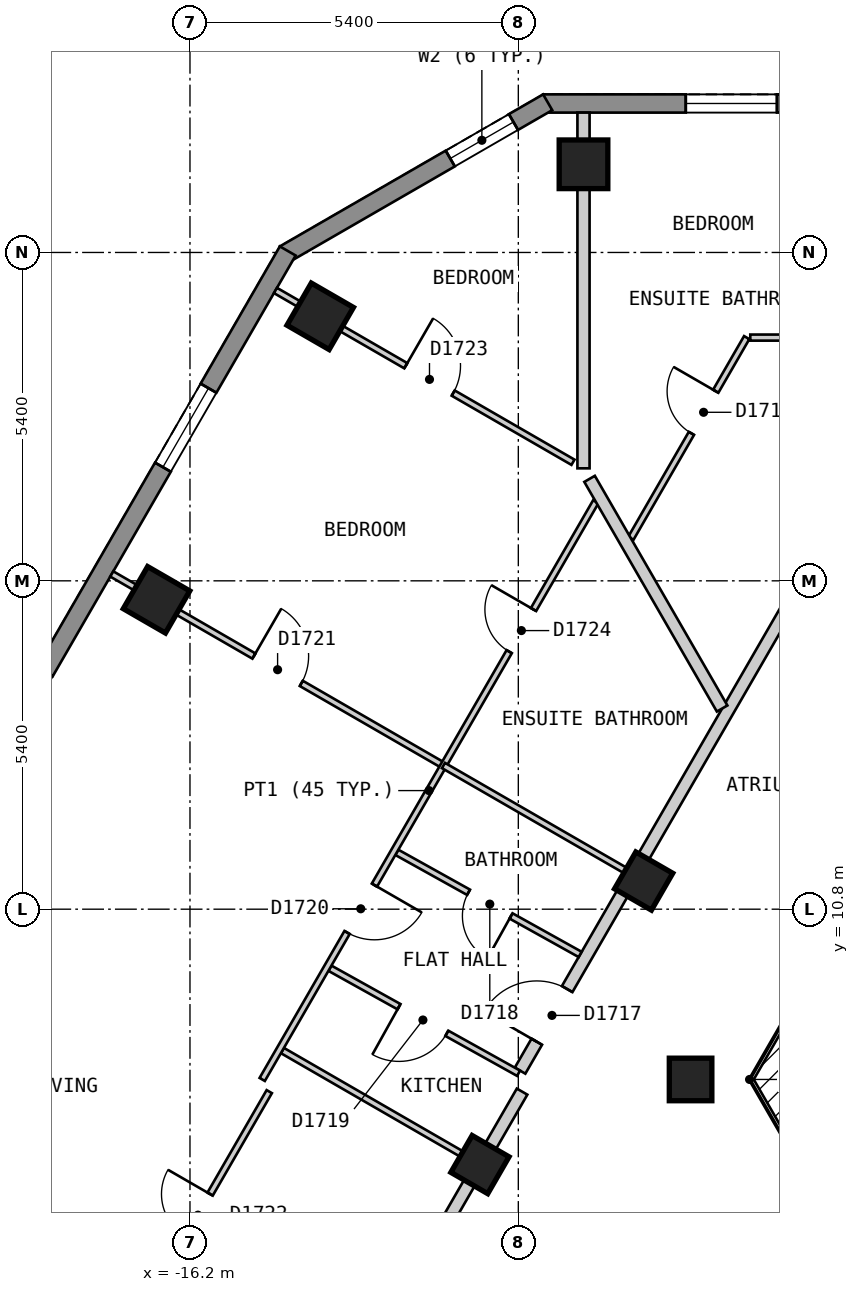
"""IFC4 building model, lengths in metres.
Left out: names, types, materials, properties, quantities, classifications, styles, units other than length and angle.
Written with IfcOpenShell. Run it as: python <this file> out.ifc"""

import sys

from ifc_helpers import new_model, si_unit, direction, frame, frame_2d, origin, origin_2d, place, context, subcontext, project, spatial, polyline, rectangle, outline, extrude, element, fill, save


model = new_model("IFC4")
c1 = context("Model", 3, precision=1e-05, world=origin(), true_north=direction((0.0, 1.0)))
c2 = subcontext(c1, "Body", "Model", "MODEL_VIEW")
j1 = project(units=[si_unit("LENGTHUNIT", "METRE"), si_unit("PLANEANGLEUNIT", "RADIAN")], contexts=[c1])
p1 = place(None, origin())
s1 = spatial("IfcSite", under=j1, at=p1, CompositionType="ELEMENT")
p2 = place(p1, origin())
s2 = spatial("IfcBuilding", under=s1, at=p2, CompositionType="ELEMENT")
p3 = place(p2, frame((0.0, 0.0, 187.2)))
s3 = spatial("IfcBuildingStorey", under=s2, at=p3, CompositionType="ELEMENT", Elevation=187.2)
for number, where, z_axis, x_axis in (
    (1, (-9.728, 23.05, 0.0), (0.0, 0.0, 1.0), (-1.0, 0.0, 0.0)),
    (2, (-14.058, 20.55, 0.0), (0.0, 0.0, 1.0), (-0.5, -0.866, 0.0)),
    (3, (-16.75, 15.888, 0.0), (0.0, 0.0, 1.0), (-0.5, -0.866, 0.0)),
):
    element("IfcColumn", number, at=place(p3, frame(where, z_axis=z_axis, x_axis=x_axis)), inside=s3, PredefinedType="COLUMN", context=c2, shape_type="SweptSolid", body=[
        extrude(rectangle(XDim=0.8, YDim=0.8, at=origin_2d()), origin(), (0.0, 0.0, 1.0), 3.0),
    ])
for number, where, z_axis, x_axis in (
    (4, (-8.739, 11.263, 0.0), (0.0, 0.0, 1.0), (-0.5, -0.866, 0.0)),
    (5, (-7.967, 8.0, 0.0), (0.0, 0.0, 1.0), (1.0, 0.0, 0.0)),
    (6, (-11.431, 6.6, 0.0), (0.0, 0.0, 1.0), (-0.5, -0.866, 0.0)),
):
    element("IfcColumn", number, at=place(p3, frame(where, z_axis=z_axis, x_axis=x_axis)), inside=s3, PredefinedType="COLUMN", context=c2, shape_type="SweptSolid", body=[
        extrude(rectangle(XDim=0.7, YDim=0.7, at=origin_2d()), origin(), (0.0, 0.0, 1.0), 3.0),
    ])
p4 = place(p3, frame((10.392, 24.05, 0.0), z_axis=(0.0, 0.0, 1.0), x_axis=(-1.0, 0.0, 0.0)))
e7 = element("IfcWall", 7, at=p4, inside=s3, PredefinedType="SOLIDWALL", context=c2, shape_type="SweptSolid", body=[
    extrude(outline(polyline([(0.0, -0.15), (20.784, -0.15), (20.704, 0.15), (0.08, 0.15), (0.0, -0.15)])), origin(), (0.0, 0.0, 1.0), 2.7),
])
p5 = place(p4, frame((2.346, 0.0, 0.15)))
e8 = element("IfcOpeningElement", 8, at=p5, cuts=e7, PredefinedType="OPENING", context=c2, shape_type="SweptSolid", body=[
    extrude(rectangle(XDim=1.5, YDim=2.1, at=frame_2d((0.75, 1.05))), frame((0.0, 0.16, 0.0), z_axis=(0.0, -1.0, 0.0), x_axis=(1.0, 0.0, 0.0)), (0.0, 0.0, 1.0), 0.32),
])
p6 = place(p4, frame((7.21, 0.0, 0.15)))
e9 = element("IfcOpeningElement", 9, at=p6, cuts=e7, PredefinedType="OPENING", context=c2, shape_type="SweptSolid", body=[
    extrude(rectangle(XDim=1.5, YDim=2.1, at=frame_2d((0.75, 1.05))), frame((0.0, 0.16, 0.0), z_axis=(0.0, -1.0, 0.0), x_axis=(1.0, 0.0, 0.0)), (0.0, 0.0, 1.0), 0.32),
])
p7 = place(p4, frame((12.074, 0.0, 0.15)))
e10 = element("IfcOpeningElement", 10, at=p7, cuts=e7, PredefinedType="OPENING", context=c2, shape_type="SweptSolid", body=[
    extrude(rectangle(XDim=1.5, YDim=2.1, at=frame_2d((0.75, 1.05))), frame((0.0, 0.16, 0.0), z_axis=(0.0, -1.0, 0.0), x_axis=(1.0, 0.0, 0.0)), (0.0, 0.0, 1.0), 0.32),
])
p8 = place(p4, frame((16.938, 0.0, 0.15)))
e11 = element("IfcOpeningElement", 11, at=p8, cuts=e7, PredefinedType="OPENING", context=c2, shape_type="SweptSolid", body=[
    extrude(rectangle(XDim=1.5, YDim=2.1, at=frame_2d((0.75, 1.05))), frame((0.0, 0.16, 0.0), z_axis=(0.0, -1.0, 0.0), x_axis=(1.0, 0.0, 0.0)), (0.0, 0.0, 1.0), 0.32),
])
p9 = place(p3, frame((-10.317, 24.07, 0.0), z_axis=(0.0, 0.0, 1.0), x_axis=(-0.866022959057, -0.500004234368, 0.0)))
e12 = element("IfcWall", 12, at=p9, inside=s3, PredefinedType="SOLIDWALL", context=c2, shape_type="SweptSolid", body=[
    extrude(outline(polyline([(0.0, -0.15), (5.0, -0.15), (4.92, 0.15), (0.08, 0.15), (0.0, -0.15)])), origin(), (0.0, 0.0, 1.0), 2.7),
])
p10 = place(p9, frame((0.65, 0.0, 0.15)))
e13 = element("IfcOpeningElement", 13, at=p10, cuts=e12, PredefinedType="OPENING", context=c2, shape_type="SweptSolid", body=[
    extrude(rectangle(XDim=1.2, YDim=2.1, at=frame_2d((0.6, 1.05))), frame((0.0, 0.16, 0.0), z_axis=(0.0, -1.0, 0.0), x_axis=(1.0, 0.0, 0.0)), (0.0, 0.0, 1.0), 0.32),
])
p11 = place(p3, frame((-14.592, 21.625, 0.0), z_axis=(0.0, 0.0, 1.0), x_axis=(-0.500010537973, -0.866019319597, 0.0)))
e14 = element("IfcWall", 14, at=p11, inside=s3, PredefinedType="SOLIDWALL", context=c2, shape_type="SweptSolid", body=[
    extrude(outline(polyline([(0.0, -0.15), (22.863, -0.15), (22.783, 0.15), (0.08, 0.15), (0.0, -0.15)])), origin(), (0.0, 0.0, 1.0), 2.7),
])
p12 = place(p11, frame((2.606, 0.0, 0.15)))
e15 = element("IfcOpeningElement", 15, at=p12, cuts=e14, PredefinedType="OPENING", context=c2, shape_type="SweptSolid", body=[
    extrude(rectangle(XDim=1.5, YDim=2.1, at=frame_2d((0.75, 1.05))), frame((0.0, 0.16, 0.0), z_axis=(0.0, -1.0, 0.0), x_axis=(1.0, 0.0, 0.0)), (0.0, 0.0, 1.0), 0.32),
])
p13 = place(p11, frame((7.99, 0.0, 0.15)))
e16 = element("IfcOpeningElement", 16, at=p13, cuts=e14, PredefinedType="OPENING", context=c2, shape_type="SweptSolid", body=[
    extrude(rectangle(XDim=1.5, YDim=2.1, at=frame_2d((0.75, 1.05))), frame((0.0, 0.16, 0.0), z_axis=(0.0, -1.0, 0.0), x_axis=(1.0, 0.0, 0.0)), (0.0, 0.0, 1.0), 0.32),
])
p14 = place(p11, frame((13.373, 0.0, 0.15)))
e17 = element("IfcOpeningElement", 17, at=p14, cuts=e14, PredefinedType="OPENING", context=c2, shape_type="SweptSolid", body=[
    extrude(rectangle(XDim=1.5, YDim=2.1, at=frame_2d((0.75, 1.05))), frame((0.0, 0.16, 0.0), z_axis=(0.0, -1.0, 0.0), x_axis=(1.0, 0.0, 0.0)), (0.0, 0.0, 1.0), 0.32),
])
p15 = place(p11, frame((18.758, 0.0, 0.15)))
e18 = element("IfcOpeningElement", 18, at=p15, cuts=e14, PredefinedType="OPENING", context=c2, shape_type="SweptSolid", body=[
    extrude(rectangle(XDim=1.5, YDim=2.1, at=frame_2d((0.75, 1.05))), frame((0.0, 0.16, 0.0), z_axis=(0.0, -1.0, 0.0), x_axis=(1.0, 0.0, 0.0)), (0.0, 0.0, 1.0), 0.32),
])
p16 = place(p3, frame((-15.53, -0.501, 0.0), z_axis=(0.0, 0.0, 1.0), x_axis=(0.499952498232, 0.866052827206, 0.0)))
e19 = element("IfcWall", 19, at=p16, inside=s3, PredefinedType="PARTITIONING", context=c2, shape_type="SweptSolid", body=[
    extrude(rectangle(XDim=9.585, YDim=0.2, at=frame_2d((4.792, 0.0))), origin(), (0.0, 0.0, 1.0), 2.7),
])
p17 = place(p16, frame((0.525, 0.0, 0.0)))
e20 = element("IfcOpeningElement", 20, at=p17, cuts=e19, PredefinedType="OPENING", context=c2, shape_type="SweptSolid", body=[
    extrude(rectangle(XDim=1.0, YDim=2.1, at=frame_2d((0.5, 1.05))), frame((0.0, 0.11, 0.0), z_axis=(0.0, -1.0, 0.0), x_axis=(1.0, 0.0, 0.0)), (0.0, 0.0, 1.0), 0.22),
])
p18 = place(p3, frame((-10.771, 8.145, 0.0), z_axis=(0.0, 0.0, 1.0), x_axis=(0.500048075867, 0.865997645391, 0.0)))
e21 = element("IfcWall", 21, at=p18, inside=s3, PredefinedType="PARTITIONING", context=c2, shape_type="SweptSolid", body=[
    extrude(rectangle(XDim=10.687, YDim=0.2, at=frame_2d((5.344, 0.0))), origin(), (0.0, 0.0, 1.0), 2.7),
])
p19 = place(p18, frame((0.549, 0.0, 0.0)))
e22 = element("IfcOpeningElement", 22, at=p19, cuts=e21, PredefinedType="OPENING", context=c2, shape_type="SweptSolid", body=[
    extrude(rectangle(XDim=1.0, YDim=2.1, at=frame_2d((0.5, 1.05))), frame((0.0, 0.11, 0.0), z_axis=(0.0, -1.0, 0.0), x_axis=(1.0, 0.0, 0.0)), (0.0, 0.0, 1.0), 0.22),
])
p20 = place(p3, frame((-12.798, 11.735, 0.0), z_axis=(0.0, 0.0, 1.0), x_axis=(0.873649600774, -0.486555623816, 0.0)))
e23 = element("IfcWall", 23, at=p20, inside=s3, PredefinedType="PARTITIONING", context=c2, shape_type="SweptSolid", body=[
    extrude(rectangle(XDim=3.451, YDim=0.1, at=frame_2d((1.726, 0.0))), origin(), (0.0, 0.0, 1.0), 2.7),
])
p21 = place(p20, frame((1.35, 0.0, 0.0)))
e24 = element("IfcOpeningElement", 24, at=p21, cuts=e23, PredefinedType="OPENING", context=c2, shape_type="SweptSolid", body=[
    extrude(rectangle(XDim=0.8, YDim=2.1, at=frame_2d((0.4, 1.05))), frame((0.0, 0.06, 0.0), z_axis=(0.0, -1.0, 0.0), x_axis=(1.0, 0.0, 0.0)), (0.0, 0.0, 1.0), 0.12),
])
p22 = place(p3, frame((-13.898, 9.829, 0.0), z_axis=(0.0, 0.0, 1.0), x_axis=(0.873715787747, -0.486436760784, 0.0)))
e25 = element("IfcWall", 25, at=p22, inside=s3, PredefinedType="PARTITIONING", context=c2, shape_type="SweptSolid", body=[
    extrude(rectangle(XDim=3.55, YDim=0.1, at=frame_2d((1.775, 0.0))), origin(), (0.0, 0.0, 1.0), 2.7),
])
p23 = place(p22, frame((1.3, 0.0, 0.0)))
e26 = element("IfcOpeningElement", 26, at=p23, cuts=e25, PredefinedType="OPENING", context=c2, shape_type="SweptSolid", body=[
    extrude(rectangle(XDim=0.9, YDim=2.1, at=frame_2d((0.45, 1.05))), frame((0.0, 0.06, 0.0), z_axis=(0.0, -1.0, 0.0), x_axis=(1.0, 0.0, 0.0)), (0.0, 0.0, 1.0), 0.12),
])
p24 = place(p3, frame((-14.679, 8.475, 0.0), z_axis=(0.0, 0.0, 1.0), x_axis=(0.865995104784, -0.500052475737, 0.0)))
e27 = element("IfcWall", 27, at=p24, inside=s3, PredefinedType="PARTITIONING", context=c2, shape_type="SweptSolid", body=[
    extrude(rectangle(XDim=3.65, YDim=0.1, at=frame_2d((1.825, 0.0))), origin(), (0.0, 0.0, 1.0), 2.7),
])
p25 = place(p3, frame((-17.486, 16.313, 0.0), z_axis=(0.0, 0.0, 1.0), x_axis=(0.865997114097, -0.500048995975, 0.0)))
e28 = element("IfcWall", 28, at=p25, inside=s3, PredefinedType="PARTITIONING", context=c2, shape_type="SweptSolid", body=[
    extrude(rectangle(XDim=6.299, YDim=0.1, at=frame_2d((3.149, 0.0))), origin(), (0.0, 0.0, 1.0), 2.7),
])
p26 = place(p25, frame((2.699, 0.0, 0.0)))
e29 = element("IfcOpeningElement", 29, at=p26, cuts=e28, PredefinedType="OPENING", context=c2, shape_type="SweptSolid", body=[
    extrude(rectangle(XDim=0.9, YDim=2.1, at=frame_2d((0.45, 1.05))), frame((0.0, 0.06, 0.0), z_axis=(0.0, -1.0, 0.0), x_axis=(1.0, 0.0, 0.0)), (0.0, 0.0, 1.0), 0.12),
])
p27 = place(p3, frame((-14.794, 20.975, 0.0), z_axis=(0.0, 0.0, 1.0), x_axis=(0.866011447264, -0.500024172624, 0.0)))
e30 = element("IfcWall", 30, at=p27, inside=s3, PredefinedType="PARTITIONING", context=c2, shape_type="SweptSolid", body=[
    extrude(rectangle(XDim=5.65, YDim=0.1, at=frame_2d((2.825, 0.0))), origin(), (0.0, 0.0, 1.0), 2.7),
])
p28 = place(p27, frame((2.475, 0.0, 0.0)))
e31 = element("IfcOpeningElement", 31, at=p28, cuts=e30, PredefinedType="OPENING", context=c2, shape_type="SweptSolid", body=[
    extrude(rectangle(XDim=0.9, YDim=2.1, at=frame_2d((0.45, 1.05))), frame((0.0, 0.06, 0.0), z_axis=(0.0, -1.0, 0.0), x_axis=(1.0, 0.0, 0.0)), (0.0, 0.0, 1.0), 0.12),
])
p29 = place(p3, frame((-6.985, 20.2, 0.0), z_axis=(0.0, 0.0, 1.0), x_axis=(1.0, 0.0, 0.0)))
e32 = element("IfcWall", 32, at=p29, inside=s3, PredefinedType="PARTITIONING", context=c2, shape_type="SweptSolid", body=[
    extrude(rectangle(XDim=6.935, YDim=0.1, at=frame_2d((3.468, 0.0))), origin(), (0.0, 0.0, 1.0), 2.7),
])
p30 = place(p29, frame((4.153, 0.0, 0.0)))
e33 = element("IfcOpeningElement", 33, at=p30, cuts=e32, PredefinedType="OPENING", context=c2, shape_type="SweptSolid", body=[
    extrude(rectangle(XDim=0.8, YDim=2.1, at=frame_2d((0.4, 1.05))), frame((0.0, 0.06, 0.0), z_axis=(0.0, -1.0, 0.0), x_axis=(1.0, 0.0, 0.0)), (0.0, 0.0, 1.0), 0.12),
])
p31 = place(p3, frame((-8.949, 16.9, 0.0), z_axis=(0.0, 0.0, 1.0), x_axis=(0.499949850951, 0.866054355415, 0.0)))
e34 = element("IfcWall", 34, at=p31, inside=s3, PredefinedType="PARTITIONING", context=c2, shape_type="SweptSolid", body=[
    extrude(rectangle(XDim=3.811, YDim=0.1, at=frame_2d((1.905, 0.0))), origin(), (0.0, 0.0, 1.0), 2.7),
])
p32 = place(p31, frame((1.992, 0.0, 0.0)))
e35 = element("IfcOpeningElement", 35, at=p32, cuts=e34, PredefinedType="OPENING", context=c2, shape_type="SweptSolid", body=[
    extrude(rectangle(XDim=0.8, YDim=2.1, at=frame_2d((0.4, 1.05))), frame((0.0, 0.06, 0.0), z_axis=(0.0, -1.0, 0.0), x_axis=(1.0, 0.0, 0.0)), (0.0, 0.0, 1.0), 0.12),
])
p33 = place(p3, frame((-17.191, 3.824, 0.0), z_axis=(0.0, 0.0, 1.0), x_axis=(0.499891250406, 0.866088181288, 0.0)))
e36 = element("IfcWall", 36, at=p33, inside=s3, PredefinedType="PARTITIONING", context=c2, shape_type="SweptSolid", body=[
    extrude(rectangle(XDim=4.591, YDim=0.1, at=frame_2d((2.295, 0.0))), origin(), (0.0, 0.0, 1.0), 2.7),
])
p34 = place(p33, frame((1.845, 0.0, 0.0)))
e37 = element("IfcOpeningElement", 37, at=p34, cuts=e36, PredefinedType="OPENING", context=c2, shape_type="SweptSolid", body=[
    extrude(rectangle(XDim=0.8, YDim=2.1, at=frame_2d((0.4, 1.05))), frame((0.0, 0.06, 0.0), z_axis=(0.0, -1.0, 0.0), x_axis=(1.0, 0.0, 0.0)), (0.0, 0.0, 1.0), 0.12),
])
p35 = place(p3, frame((-15.012, 8.0, 0.0), z_axis=(0.0, 0.0, 1.0), x_axis=(0.500047346826, 0.865998066356, 0.0)))
e38 = element("IfcWall", 38, at=p35, inside=s3, PredefinedType="PARTITIONING", context=c2, shape_type="SweptSolid", body=[
    extrude(rectangle(XDim=10.971, YDim=0.1, at=frame_2d((5.486, 0.0))), origin(), (0.0, 0.0, 1.0), 2.7),
])
p36 = place(p35, frame((2.791, 0.0, 0.0)))
e39 = element("IfcOpeningElement", 39, at=p36, cuts=e38, PredefinedType="OPENING", context=c2, shape_type="SweptSolid", body=[
    extrude(rectangle(XDim=0.9, YDim=2.1, at=frame_2d((0.45, 1.05))), frame((0.0, 0.06, 0.0), z_axis=(0.0, -1.0, 0.0), x_axis=(1.0, 0.0, 0.0)), (0.0, 0.0, 1.0), 0.12),
])
p37 = place(p35, frame((8.124, 0.0, 0.0)))
e40 = element("IfcOpeningElement", 40, at=p37, cuts=e38, PredefinedType="OPENING", context=c2, shape_type="SweptSolid", body=[
    extrude(rectangle(XDim=0.8, YDim=2.1, at=frame_2d((0.4, 1.05))), frame((0.0, 0.06, 0.0), z_axis=(0.0, -1.0, 0.0), x_axis=(1.0, 0.0, 0.0)), (0.0, 0.0, 1.0), 0.12),
])
p38 = place(p3, frame((-9.628, 17.877, 0.0), z_axis=(0.0, 0.0, 1.0), x_axis=(0.499890461358, -0.866088636713, 0.0)))
e41 = element("IfcWall", 41, at=p38, inside=s3, PredefinedType="PARTITIONING", context=c2, shape_type="SweptSolid", body=[
    extrude(rectangle(XDim=4.361, YDim=0.2, at=frame_2d((2.18, 0.0))), origin(), (0.0, 0.0, 1.0), 2.7),
])
p39 = place(p3, frame((-22.87, 6.987, 0.0), z_axis=(0.0, 0.0, 1.0), x_axis=(0.866022959057, -0.500004234368, 0.0)))
e42 = element("IfcWall", 42, at=p39, inside=s3, PredefinedType="PARTITIONING", context=c2, shape_type="SweptSolid", body=[
    extrude(rectangle(XDim=10.0, YDim=0.2, at=frame_2d((5.0, 0.0))), origin(), (0.0, 0.0, 1.0), 2.7),
])
p40 = place(p3, frame((-9.728, 18.05, 0.0), z_axis=(0.0, 0.0, 1.0), x_axis=(0.0, 1.0, 0.0)))
e43 = element("IfcWall", 43, at=p40, inside=s3, PredefinedType="PARTITIONING", context=c2, shape_type="SweptSolid", body=[
    extrude(rectangle(XDim=5.85, YDim=0.2, at=frame_2d((2.925, 0.0))), origin(), (0.0, 0.0, 1.0), 2.7),
])
p41 = place(p3, frame((-12.031, 13.163, 0.0), z_axis=(0.0, 0.0, 1.0), x_axis=(0.86608920467, -0.499889477339, 0.0)))
e44 = element("IfcWall", 44, at=p41, inside=s3, PredefinedType="PARTITIONING", context=c2, shape_type="SweptSolid", body=[
    extrude(rectangle(XDim=3.501, YDim=0.1, at=frame_2d((1.75, 0.0))), origin(), (0.0, 0.0, 1.0), 2.7),
])
p42 = place(p8, origin())
e45 = element("IfcWindow", 45, at=p42, inside=s3, PartitioningType="SINGLE_PANEL", PredefinedType="WINDOW", context=c2, shape_type="SweptSolid", body=[
    extrude(rectangle(XDim=1.5, YDim=2.1, at=frame_2d((0.75, 1.05))), frame((0.0, 0.03, 0.0), z_axis=(0.0, -1.0, 0.0), x_axis=(1.0, 0.0, 0.0)), (0.0, 0.0, 1.0), 0.06),
])
fill(e11, e45)
p43 = place(p10, origin())
e46 = element("IfcWindow", 46, at=p43, inside=s3, PartitioningType="SINGLE_PANEL", PredefinedType="WINDOW", context=c2, shape_type="SweptSolid", body=[
    extrude(rectangle(XDim=1.2, YDim=2.1, at=frame_2d((0.6, 1.05))), frame((0.0, 0.03, 0.0), z_axis=(0.0, -1.0, 0.0), x_axis=(1.0, 0.0, 0.0)), (0.0, 0.0, 1.0), 0.06),
])
fill(e13, e46)
p44 = place(p12, origin())
e47 = element("IfcWindow", 47, at=p44, inside=s3, PartitioningType="SINGLE_PANEL", PredefinedType="WINDOW", context=c2, shape_type="SweptSolid", body=[
    extrude(rectangle(XDim=1.5, YDim=2.1, at=frame_2d((0.75, 1.05))), frame((0.0, 0.03, 0.0), z_axis=(0.0, -1.0, 0.0), x_axis=(1.0, 0.0, 0.0)), (0.0, 0.0, 1.0), 0.06),
])
fill(e15, e47)
p45 = place(p32, origin())
e48 = element("IfcDoor", 48, at=p45, inside=s3, OperationType="SINGLE_SWING_RIGHT", PredefinedType="DOOR", context=c2, shape_type="SweptSolid", body=[
    extrude(rectangle(XDim=0.8, YDim=2.1, at=frame_2d((0.4, 1.05))), frame((0.0, 0.025, 0.0), z_axis=(0.0, -1.0, 0.0), x_axis=(1.0, 0.0, 0.0)), (0.0, 0.0, 1.0), 0.05),
])
fill(e35, e48)
p46 = place(p19, origin())
e49 = element("IfcDoor", 49, at=p46, inside=s3, OperationType="SINGLE_SWING_LEFT", PredefinedType="DOOR", context=c2, shape_type="SweptSolid", body=[
    extrude(rectangle(XDim=1.0, YDim=2.1, at=frame_2d((0.5, 1.05))), frame((0.0, 0.025, 0.0), z_axis=(0.0, -1.0, 0.0), x_axis=(1.0, 0.0, 0.0)), (0.0, 0.0, 1.0), 0.05),
])
fill(e22, e49)
p47 = place(p21, origin())
e50 = element("IfcDoor", 50, at=p47, inside=s3, OperationType="SINGLE_SWING_RIGHT", PredefinedType="DOOR", context=c2, shape_type="SweptSolid", body=[
    extrude(rectangle(XDim=0.8, YDim=2.1, at=frame_2d((0.4, 1.05))), frame((0.0, 0.025, 0.0), z_axis=(0.0, -1.0, 0.0), x_axis=(1.0, 0.0, 0.0)), (0.0, 0.0, 1.0), 0.05),
])
fill(e24, e50)
p48 = place(p23, origin())
e51 = element("IfcDoor", 51, at=p48, inside=s3, OperationType="SINGLE_SWING_LEFT", PredefinedType="DOOR", context=c2, shape_type="SweptSolid", body=[
    extrude(rectangle(XDim=0.9, YDim=2.1, at=frame_2d((0.45, 1.05))), frame((0.0, 0.025, 0.0), z_axis=(0.0, -1.0, 0.0), x_axis=(1.0, 0.0, 0.0)), (0.0, 0.0, 1.0), 0.05),
])
fill(e26, e51)
p49 = place(p36, origin())
e52 = element("IfcDoor", 52, at=p49, inside=s3, OperationType="SINGLE_SWING_RIGHT", PredefinedType="DOOR", context=c2, shape_type="SweptSolid", body=[
    extrude(rectangle(XDim=0.9, YDim=2.1, at=frame_2d((0.45, 1.05))), frame((0.0, 0.025, 0.0), z_axis=(0.0, -1.0, 0.0), x_axis=(1.0, 0.0, 0.0)), (0.0, 0.0, 1.0), 0.05),
])
fill(e39, e52)
p50 = place(p26, origin())
e53 = element("IfcDoor", 53, at=p50, inside=s3, OperationType="SINGLE_SWING_LEFT", PredefinedType="DOOR", context=c2, shape_type="SweptSolid", body=[
    extrude(rectangle(XDim=0.9, YDim=2.1, at=frame_2d((0.45, 1.05))), frame((0.0, 0.025, 0.0), z_axis=(0.0, -1.0, 0.0), x_axis=(1.0, 0.0, 0.0)), (0.0, 0.0, 1.0), 0.05),
])
fill(e29, e53)
p51 = place(p34, origin())
e54 = element("IfcDoor", 54, at=p51, inside=s3, OperationType="SINGLE_SWING_RIGHT", PredefinedType="DOOR", context=c2, shape_type="SweptSolid", body=[
    extrude(rectangle(XDim=0.8, YDim=2.1, at=frame_2d((0.4, 1.05))), frame((0.0, 0.025, 0.0), z_axis=(0.0, -1.0, 0.0), x_axis=(1.0, 0.0, 0.0)), (0.0, 0.0, 1.0), 0.05),
])
fill(e37, e54)
p52 = place(p28, origin())
e55 = element("IfcDoor", 55, at=p52, inside=s3, OperationType="SINGLE_SWING_LEFT", PredefinedType="DOOR", context=c2, shape_type="SweptSolid", body=[
    extrude(rectangle(XDim=0.9, YDim=2.1, at=frame_2d((0.45, 1.05))), frame((0.0, 0.025, 0.0), z_axis=(0.0, -1.0, 0.0), x_axis=(1.0, 0.0, 0.0)), (0.0, 0.0, 1.0), 0.05),
])
fill(e31, e55)
p53 = place(p37, origin())
e56 = element("IfcDoor", 56, at=p53, inside=s3, OperationType="SINGLE_SWING_RIGHT", PredefinedType="DOOR", context=c2, shape_type="SweptSolid", body=[
    extrude(rectangle(XDim=0.8, YDim=2.1, at=frame_2d((0.4, 1.05))), frame((0.0, 0.025, 0.0), z_axis=(0.0, -1.0, 0.0), x_axis=(1.0, 0.0, 0.0)), (0.0, 0.0, 1.0), 0.05),
])
fill(e40, e56)
save(model, sys.argv[1])
